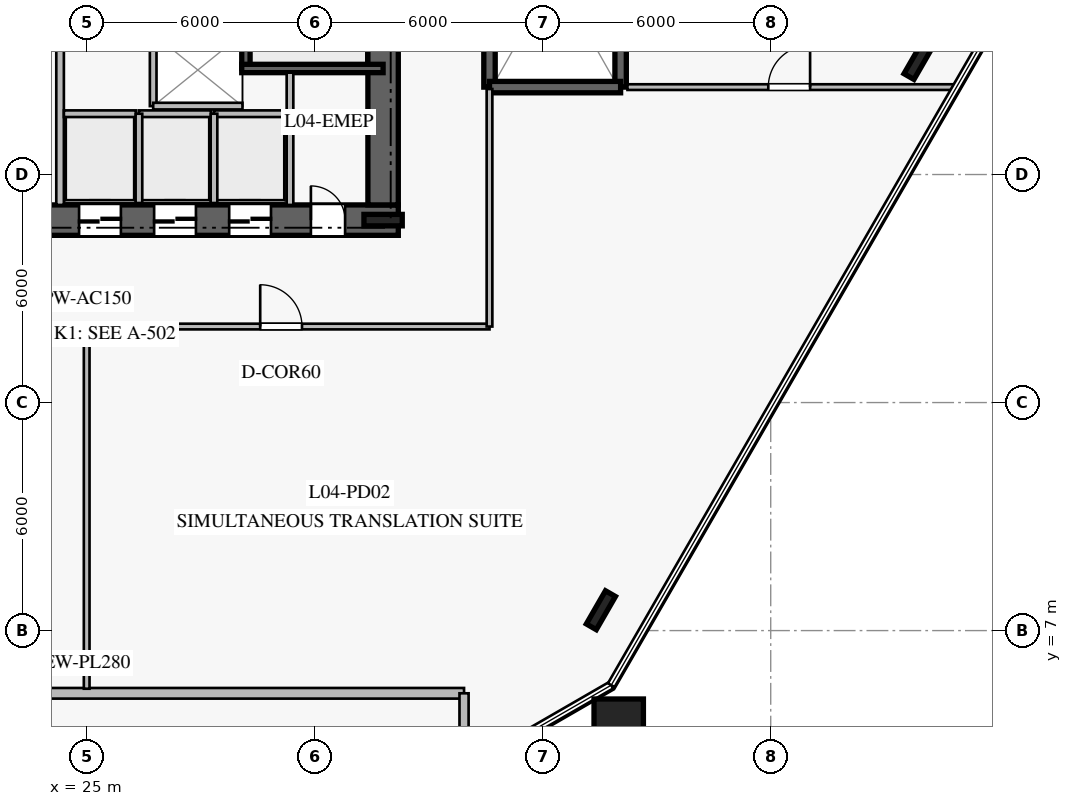
"""IFC4 building model, lengths in metres.
Left out: names, types, materials, properties, quantities, classifications, styles, units other than length and angle.
Written with IfcOpenShell. Run it as: python <this file> out.ifc"""

import sys

from ifc_helpers import new_model, si_unit, direction, frame, frame_2d, origin, origin_2d, place, context, subcontext, project, spatial, rectangle, i_section, extrude, element, fill, save


model = new_model("IFC4")
c1 = context("Model", 3, precision=1e-05, world=origin(), true_north=direction((0.0, 1.0)))
c2 = subcontext(c1, "Body", "Model", "MODEL_VIEW")
j1 = project(units=[si_unit("LENGTHUNIT", "METRE"), si_unit("PLANEANGLEUNIT", "RADIAN")], contexts=[c1])
p1 = place(None, origin())
s1 = spatial("IfcSite", under=j1, at=p1, CompositionType="ELEMENT")
p2 = place(p1, origin())
s2 = spatial("IfcBuilding", under=s1, at=p2, CompositionType="ELEMENT")
p3 = place(p2, frame((0.0, 0.0, 19.0)))
s3 = spatial("IfcBuildingStorey", under=s2, at=p3, CompositionType="ELEMENT", Elevation=19.0)
p4 = place(p3, frame((16.8, 17.8, 0.0), z_axis=(0.0, 0.0, 1.0), x_axis=(1.0, 0.0, 0.0)))
e1 = element("IfcWall", 1, at=p4, inside=s3, PredefinedType="SHEAR", context=c2, shape_type="SweptSolid", body=[
    extrude(rectangle(XDim=16.4, YDim=0.8, at=frame_2d((8.2, 0.0))), origin(), (0.0, 0.0, 1.0), 4.76),
])
p5 = place(p4, frame((5.15, 0.0, 0.0)))
e2 = element("IfcOpeningElement", 2, at=p5, cuts=e1, PredefinedType="OPENING", context=c2, shape_type="SweptSolid", body=[
    extrude(rectangle(XDim=1.2, YDim=2.25, at=frame_2d((0.6, 1.125))), frame((0.0, 0.41, 0.0), z_axis=(0.0, -1.0, 0.0), x_axis=(1.0, 0.0, 0.0)), (0.0, 0.0, 1.0), 0.82),
])
p6 = place(p4, frame((14.1, 0.0, 0.0)))
e3 = element("IfcOpeningElement", 3, at=p6, cuts=e1, PredefinedType="OPENING", context=c2, shape_type="SweptSolid", body=[
    extrude(rectangle(XDim=0.9, YDim=2.1, at=frame_2d((0.45, 1.05))), frame((0.0, 0.41, 0.0), z_axis=(0.0, -1.0, 0.0), x_axis=(1.0, 0.0, 0.0)), (0.0, 0.0, 1.0), 0.82),
])
p7 = place(p4, frame((8.0, 0.0, 0.0)))
e4 = element("IfcOpeningElement", 4, at=p7, cuts=e1, PredefinedType="OPENING", context=c2, shape_type="SweptSolid", body=[
    extrude(rectangle(XDim=1.1, YDim=2.2, at=frame_2d((0.55, 1.1))), frame((0.0, 0.41, 0.0), z_axis=(0.0, -1.0, 0.0), x_axis=(1.0, 0.0, 0.0)), (0.0, 0.0, 1.0), 0.82),
])
p8 = place(p4, frame((9.975, 0.0, 0.0)))
e5 = element("IfcOpeningElement", 5, at=p8, cuts=e1, PredefinedType="OPENING", context=c2, shape_type="SweptSolid", body=[
    extrude(rectangle(XDim=1.1, YDim=2.2, at=frame_2d((0.55, 1.1))), frame((0.0, 0.41, 0.0), z_axis=(0.0, -1.0, 0.0), x_axis=(1.0, 0.0, 0.0)), (0.0, 0.0, 1.0), 0.82),
])
p9 = place(p4, frame((11.95, 0.0, 0.0)))
e6 = element("IfcOpeningElement", 6, at=p9, cuts=e1, PredefinedType="OPENING", context=c2, shape_type="SweptSolid", body=[
    extrude(rectangle(XDim=1.1, YDim=2.2, at=frame_2d((0.55, 1.1))), frame((0.0, 0.41, 0.0), z_axis=(0.0, -1.0, 0.0), x_axis=(1.0, 0.0, 0.0)), (0.0, 0.0, 1.0), 0.82),
])
p10 = place(p3, frame((32.8, 18.2, 0.0), z_axis=(0.0, 0.0, 1.0), x_axis=(0.0, 1.0, 0.0)))
e7 = element("IfcWall", 7, at=p10, inside=s3, PredefinedType="SHEAR", context=c2, shape_type="SweptSolid", body=[
    extrude(rectangle(XDim=13.6, YDim=0.8, at=frame_2d((6.8, 0.0))), origin(), (0.0, 0.0, 1.0), 4.76),
])
p11 = place(p3, frame((32.8, 17.8, 0.0), z_axis=(0.0, 0.0, 1.0), x_axis=(1.0, 0.0, 0.0)))
e8 = element("IfcColumn", 8, at=p11, inside=s3, PredefinedType="COLUMN", context=c2, shape_type="SweptSolid", body=[
    extrude(i_section(OverallWidth=0.302, OverallDepth=1.008, WebThickness=0.021, FlangeThickness=0.04, at=origin_2d()), origin(), (0.0, 0.0, 1.0), 5.0),
])
p12 = place(p3, frame((29.19, 21.79, 0.0), z_axis=(0.0, 0.0, 1.0), x_axis=(0.0, 1.0, 0.0)))
e9 = element("IfcWall", 9, at=p12, inside=s3, PredefinedType="SOLIDWALL", context=c2, shape_type="SweptSolid", body=[
    extrude(rectangle(XDim=7.22, YDim=0.22, at=frame_2d((3.61, 0.0))), origin(), (0.0, 0.0, 1.0), 4.76),
])
p13 = place(p12, frame((5.88, 0.0, 0.0)))
e10 = element("IfcOpeningElement", 10, at=p13, cuts=e9, PredefinedType="OPENING", context=c2, shape_type="SweptSolid", body=[
    extrude(rectangle(XDim=1.15, YDim=2.2, at=frame_2d((0.575, 1.1))), frame((0.0, 0.12, 0.0), z_axis=(0.0, -1.0, 0.0), x_axis=(1.0, 0.0, 0.0)), (0.0, 0.0, 1.0), 0.24),
])
p14 = place(p3, frame((29.08, 21.79, 0.0), z_axis=(0.0, 0.0, 1.0), x_axis=(1.0, 0.0, 0.0)))
e11 = element("IfcWall", 11, at=p14, inside=s3, PredefinedType="SOLIDWALL", context=c2, shape_type="SweptSolid", body=[
    extrude(rectangle(XDim=3.72, YDim=0.22, at=frame_2d((1.86, 0.0))), origin(), (0.0, 0.0, 1.0), 4.76),
])
p15 = place(p3, frame((35.6, 21.3, 0.0), z_axis=(0.0, 0.0, 1.0), x_axis=(0.0, 1.0, 0.0)))
e12 = element("IfcWall", 12, at=p15, inside=s3, PredefinedType="SOLIDWALL", context=c2, shape_type="SweptSolid", body=[
    extrude(rectangle(XDim=7.4, YDim=0.3, at=frame_2d((3.7, 0.0))), origin(), (0.0, 0.0, 1.0), 4.76),
])
p16 = place(p15, frame((5.98, 0.0, 0.0)))
e13 = element("IfcOpeningElement", 13, at=p16, cuts=e12, PredefinedType="OPENING", context=c2, shape_type="SweptSolid", body=[
    extrude(rectangle(XDim=1.15, YDim=2.2, at=frame_2d((0.575, 1.1))), frame((0.0, 0.16, 0.0), z_axis=(0.0, -1.0, 0.0), x_axis=(1.0, 0.0, 0.0)), (0.0, 0.0, 1.0), 0.32),
])
p17 = place(p3, frame((39.05, 21.3, 0.0), z_axis=(0.0, 0.0, 1.0), x_axis=(0.0, 1.0, 0.0)))
e14 = element("IfcWall", 14, at=p17, inside=s3, PredefinedType="SOLIDWALL", context=c2, shape_type="SweptSolid", body=[
    extrude(rectangle(XDim=7.4, YDim=0.3, at=frame_2d((3.7, 0.0))), origin(), (0.0, 0.0, 1.0), 4.76),
])
p18 = place(p3, frame((35.6, 21.3, 0.0), z_axis=(0.0, 0.0, 1.0), x_axis=(1.0, 0.0, 0.0)))
e15 = element("IfcWall", 15, at=p18, inside=s3, PredefinedType="SOLIDWALL", context=c2, shape_type="SweptSolid", body=[
    extrude(rectangle(XDim=3.45, YDim=0.3, at=frame_2d((1.725, 0.0))), origin(), (0.0, 0.0, 1.0), 4.76),
])
for number, where, z_axis, x_axis in (
    (16, (38.531, 7.536, 0.0), (0.0, 0.0, 1.0), (0.5, 0.866, 0.0)),
    (17, (46.89, 22.014, 0.0), (0.0, 0.0, 1.0), (0.5, 0.866, 0.0)),
):
    element("IfcColumn", number, at=place(p3, frame(where, z_axis=z_axis, x_axis=x_axis)), inside=s3, PredefinedType="COLUMN", context=c2, shape_type="SweptSolid", body=[
        extrude(i_section(OverallWidth=0.302, OverallDepth=1.008, WebThickness=0.021, FlangeThickness=0.04, at=origin_2d()), origin(), (0.0, 0.0, 1.0), 5.0),
    ])
p19 = place(p3, frame((39.0, 4.55, 0.0), z_axis=(0.0, 0.0, 1.0), x_axis=(1.0, 0.0, 0.0)))
e18 = element("IfcColumn", 18, at=p19, inside=s3, PredefinedType="COLUMN", context=c2, shape_type="SweptSolid", body=[
    extrude(rectangle(XDim=1.3, YDim=1.3, at=origin_2d()), origin(), (0.0, 0.0, 1.0), 5.0),
])
p20 = place(p3, frame((15.07, 5.35, 0.0), z_axis=(0.0, 0.0, 1.0), x_axis=(1.0, 0.0, 0.0)))
e19 = element("IfcWall", 19, at=p20, inside=s3, PredefinedType="STANDARD", context=c2, shape_type="SweptSolid", body=[
    extrude(rectangle(XDim=19.86, YDim=0.28, at=frame_2d((9.93, 0.0))), origin(), (0.0, 0.0, 1.0), 2.76),
])
p21 = place(p3, frame((34.93, 5.35, 0.0), z_axis=(0.0, 0.0, 1.0), x_axis=(0.0, -1.0, 0.0)))
e20 = element("IfcWall", 20, at=p21, inside=s3, PredefinedType="STANDARD", context=c2, shape_type="SweptSolid", body=[
    extrude(rectangle(XDim=2.023, YDim=0.24, at=frame_2d((1.012, 0.0))), origin(), (0.0, 0.0, 1.0), 4.76),
])
p22 = place(p3, frame((24.3, 18.2, 0.0), z_axis=(0.0, 0.0, 1.0), x_axis=(0.0, 1.0, 0.0)))
e21 = element("IfcWall", 21, at=p22, inside=s3, PredefinedType="PARTITIONING", context=c2, shape_type="SweptSolid", body=[
    extrude(rectangle(XDim=5.15, YDim=0.2, at=frame_2d((2.575, 0.0))), origin(), (0.0, 0.0, 1.0), 4.76),
])
p23 = place(p3, frame((30.35, 18.2, 0.0), z_axis=(0.0, 0.0, 1.0), x_axis=(0.0, 1.0, 0.0)))
e22 = element("IfcWall", 22, at=p23, inside=s3, PredefinedType="PARTITIONING", context=c2, shape_type="SweptSolid", body=[
    extrude(rectangle(XDim=3.48, YDim=0.175, at=frame_2d((1.74, 0.0))), origin(), (0.0, 0.0, 1.0), 4.76),
])
p24 = place(p3, frame((24.4, 20.6, 0.0), z_axis=(0.0, 0.0, 1.0), x_axis=(1.0, 0.0, 0.0)))
e23 = element("IfcWall", 23, at=p24, inside=s3, PredefinedType="PARTITIONING", context=c2, shape_type="SweptSolid", body=[
    extrude(rectangle(XDim=1.9, YDim=0.175, at=frame_2d((0.95, 0.0))), origin(), (0.0, 0.0, 1.0), 4.76),
])
p25 = place(p3, frame((26.375, 20.6, 0.0), z_axis=(0.0, 0.0, 1.0), x_axis=(1.0, 0.0, 0.0)))
e24 = element("IfcWall", 24, at=p25, inside=s3, PredefinedType="PARTITIONING", context=c2, shape_type="SweptSolid", body=[
    extrude(rectangle(XDim=1.9, YDim=0.175, at=frame_2d((0.95, 0.0))), origin(), (0.0, 0.0, 1.0), 4.76),
])
p26 = place(p3, frame((26.375, 18.25, 0.0), z_axis=(0.0, 0.0, 1.0), x_axis=(0.0, 1.0, 0.0)))
e25 = element("IfcWall", 25, at=p26, inside=s3, PredefinedType="PARTITIONING", context=c2, shape_type="SweptSolid", body=[
    extrude(rectangle(XDim=2.35, YDim=0.175, at=frame_2d((1.175, 0.0))), origin(), (0.0, 0.0, 1.0), 4.76),
])
p27 = place(p3, frame((28.35, 20.6, 0.0), z_axis=(0.0, 0.0, 1.0), x_axis=(1.0, 0.0, 0.0)))
e26 = element("IfcWall", 26, at=p27, inside=s3, PredefinedType="PARTITIONING", context=c2, shape_type="SweptSolid", body=[
    extrude(rectangle(XDim=1.9, YDim=0.175, at=frame_2d((0.95, 0.0))), origin(), (0.0, 0.0, 1.0), 4.76),
])
p28 = place(p3, frame((28.35, 18.25, 0.0), z_axis=(0.0, 0.0, 1.0), x_axis=(0.0, 1.0, 0.0)))
e27 = element("IfcWall", 27, at=p28, inside=s3, PredefinedType="PARTITIONING", context=c2, shape_type="SweptSolid", body=[
    extrude(rectangle(XDim=2.35, YDim=0.175, at=frame_2d((1.175, 0.0))), origin(), (0.0, 0.0, 1.0), 4.76),
])
p29 = place(p3, frame((26.75, 20.8, 0.0), z_axis=(0.0, 0.0, 1.0), x_axis=(0.0, 1.0, 0.0)))
e28 = element("IfcWall", 28, at=p29, inside=s3, PredefinedType="PARTITIONING", context=c2, shape_type="SweptSolid", body=[
    extrude(rectangle(XDim=1.9, YDim=0.175, at=frame_2d((0.95, 0.0))), origin(), (0.0, 0.0, 1.0), 4.76),
])
p30 = place(p3, frame((26.75, 20.8, 0.0), z_axis=(0.0, 0.0, 1.0), x_axis=(1.0, 0.0, 0.0)))
e29 = element("IfcWall", 29, at=p30, inside=s3, PredefinedType="PARTITIONING", context=c2, shape_type="SweptSolid", body=[
    extrude(rectangle(XDim=2.35, YDim=0.175, at=frame_2d((1.175, 0.0))), origin(), (0.0, 0.0, 1.0), 4.76),
])
p31 = place(p3, frame((14.4, 15.0, 0.0), z_axis=(0.0, 0.0, 1.0), x_axis=(1.0, 0.0, 0.0)))
e30 = element("IfcWall", 30, at=p31, inside=s3, PredefinedType="PARTITIONING", context=c2, shape_type="SweptSolid", body=[
    extrude(rectangle(XDim=21.2, YDim=0.15, at=frame_2d((10.6, 0.0))), origin(), (0.0, 0.0, 1.0), 2.76),
])
p32 = place(p31, frame((4.934, 0.0, 0.0)))
e31 = element("IfcOpeningElement", 31, at=p32, cuts=e30, PredefinedType="OPENING", context=c2, shape_type="SweptSolid", body=[
    extrude(rectangle(XDim=1.1, YDim=2.2, at=frame_2d((0.55, 1.1))), frame((0.0, 0.085, 0.0), z_axis=(0.0, -1.0, 0.0), x_axis=(1.0, 0.0, 0.0)), (0.0, 0.0, 1.0), 0.17),
])
p33 = place(p31, frame((15.166, 0.0, 0.0)))
e32 = element("IfcOpeningElement", 32, at=p33, cuts=e30, PredefinedType="OPENING", context=c2, shape_type="SweptSolid", body=[
    extrude(rectangle(XDim=1.1, YDim=2.2, at=frame_2d((0.55, 1.1))), frame((0.0, 0.085, 0.0), z_axis=(0.0, -1.0, 0.0), x_axis=(1.0, 0.0, 0.0)), (0.0, 0.0, 1.0), 0.17),
])
p34 = place(p3, frame((35.6, 15.0, 0.0), z_axis=(0.0, 0.0, 1.0), x_axis=(0.0, 1.0, 0.0)))
e33 = element("IfcWall", 33, at=p34, inside=s3, PredefinedType="PARTITIONING", context=c2, shape_type="SweptSolid", body=[
    extrude(rectangle(XDim=6.25, YDim=0.15, at=frame_2d((3.125, 0.0))), origin(), (0.0, 0.0, 1.0), 2.76),
])
p35 = place(p3, frame((39.23, 21.3, 0.0), z_axis=(0.0, 0.0, 1.0), x_axis=(1.0, 0.0, 0.0)))
e34 = element("IfcWall", 34, at=p35, inside=s3, PredefinedType="PARTITIONING", context=c2, shape_type="SweptSolid", body=[
    extrude(rectangle(XDim=8.69, YDim=0.15, at=frame_2d((4.345, 0.0))), origin(), (0.0, 0.0, 1.0), 2.76),
])
p36 = place(p35, frame((3.706, 0.0, 0.0)))
e35 = element("IfcOpeningElement", 35, at=p36, cuts=e34, PredefinedType="OPENING", context=c2, shape_type="SweptSolid", body=[
    extrude(rectangle(XDim=1.1, YDim=2.2, at=frame_2d((0.55, 1.1))), frame((0.0, 0.085, 0.0), z_axis=(0.0, -1.0, 0.0), x_axis=(1.0, 0.0, 0.0)), (0.0, 0.0, 1.0), 0.17),
])
p37 = place(p3, frame((25.0, 5.47, 0.0), z_axis=(0.0, 0.0, 1.0), x_axis=(0.0, 1.0, 0.0)))
e36 = element("IfcWall", 36, at=p37, inside=s3, PredefinedType="PARTITIONING", context=c2, shape_type="SweptSolid", body=[
    extrude(rectangle(XDim=9.5, YDim=0.15, at=frame_2d((4.75, 0.0))), origin(), (0.0, 0.0, 1.0), 2.76),
])
p38 = place(p6, origin())
e37 = element("IfcDoor", 37, at=p38, inside=s3, OperationType="SINGLE_SWING_LEFT", PredefinedType="DOOR", context=c2, shape_type="SweptSolid", body=[
    extrude(rectangle(XDim=0.9, YDim=2.1, at=frame_2d((0.45, 1.05))), frame((0.0, 0.025, 0.0), z_axis=(0.0, -1.0, 0.0), x_axis=(1.0, 0.0, 0.0)), (0.0, 0.0, 1.0), 0.05),
])
fill(e3, e37)
p39 = place(p7, origin())
e38 = element("IfcDoor", 38, at=p39, inside=s3, OperationType="DOUBLE_DOOR_SLIDING", PredefinedType="DOOR", context=c2, shape_type="SweptSolid", body=[
    extrude(rectangle(XDim=1.1, YDim=2.2, at=frame_2d((0.55, 1.1))), frame((0.0, 0.025, 0.0), z_axis=(0.0, -1.0, 0.0), x_axis=(1.0, 0.0, 0.0)), (0.0, 0.0, 1.0), 0.05),
])
fill(e4, e38)
p40 = place(p8, origin())
e39 = element("IfcDoor", 39, at=p40, inside=s3, OperationType="DOUBLE_DOOR_SLIDING", PredefinedType="DOOR", context=c2, shape_type="SweptSolid", body=[
    extrude(rectangle(XDim=1.1, YDim=2.2, at=frame_2d((0.55, 1.1))), frame((0.0, 0.025, 0.0), z_axis=(0.0, -1.0, 0.0), x_axis=(1.0, 0.0, 0.0)), (0.0, 0.0, 1.0), 0.05),
])
fill(e5, e39)
p41 = place(p9, origin())
e40 = element("IfcDoor", 40, at=p41, inside=s3, OperationType="DOUBLE_DOOR_SLIDING", PredefinedType="DOOR", context=c2, shape_type="SweptSolid", body=[
    extrude(rectangle(XDim=1.1, YDim=2.2, at=frame_2d((0.55, 1.1))), frame((0.0, 0.025, 0.0), z_axis=(0.0, -1.0, 0.0), x_axis=(1.0, 0.0, 0.0)), (0.0, 0.0, 1.0), 0.05),
])
fill(e6, e40)
p42 = place(p33, origin())
e41 = element("IfcDoor", 41, at=p42, inside=s3, OperationType="SINGLE_SWING_LEFT", PredefinedType="DOOR", context=c2, shape_type="SweptSolid", body=[
    extrude(rectangle(XDim=1.1, YDim=2.2, at=frame_2d((0.55, 1.1))), frame((0.0, 0.025, 0.0), z_axis=(0.0, -1.0, 0.0), x_axis=(1.0, 0.0, 0.0)), (0.0, 0.0, 1.0), 0.05),
])
fill(e32, e41)
p43 = place(p36, origin())
e42 = element("IfcDoor", 42, at=p43, inside=s3, OperationType="SINGLE_SWING_RIGHT", PredefinedType="DOOR", context=c2, shape_type="SweptSolid", body=[
    extrude(rectangle(XDim=1.1, YDim=2.2, at=frame_2d((0.55, 1.1))), frame((0.0, 0.025, 0.0), z_axis=(0.0, -1.0, 0.0), x_axis=(1.0, 0.0, 0.0)), (0.0, 0.0, 1.0), 0.05),
])
fill(e35, e42)
save(model, sys.argv[1])
